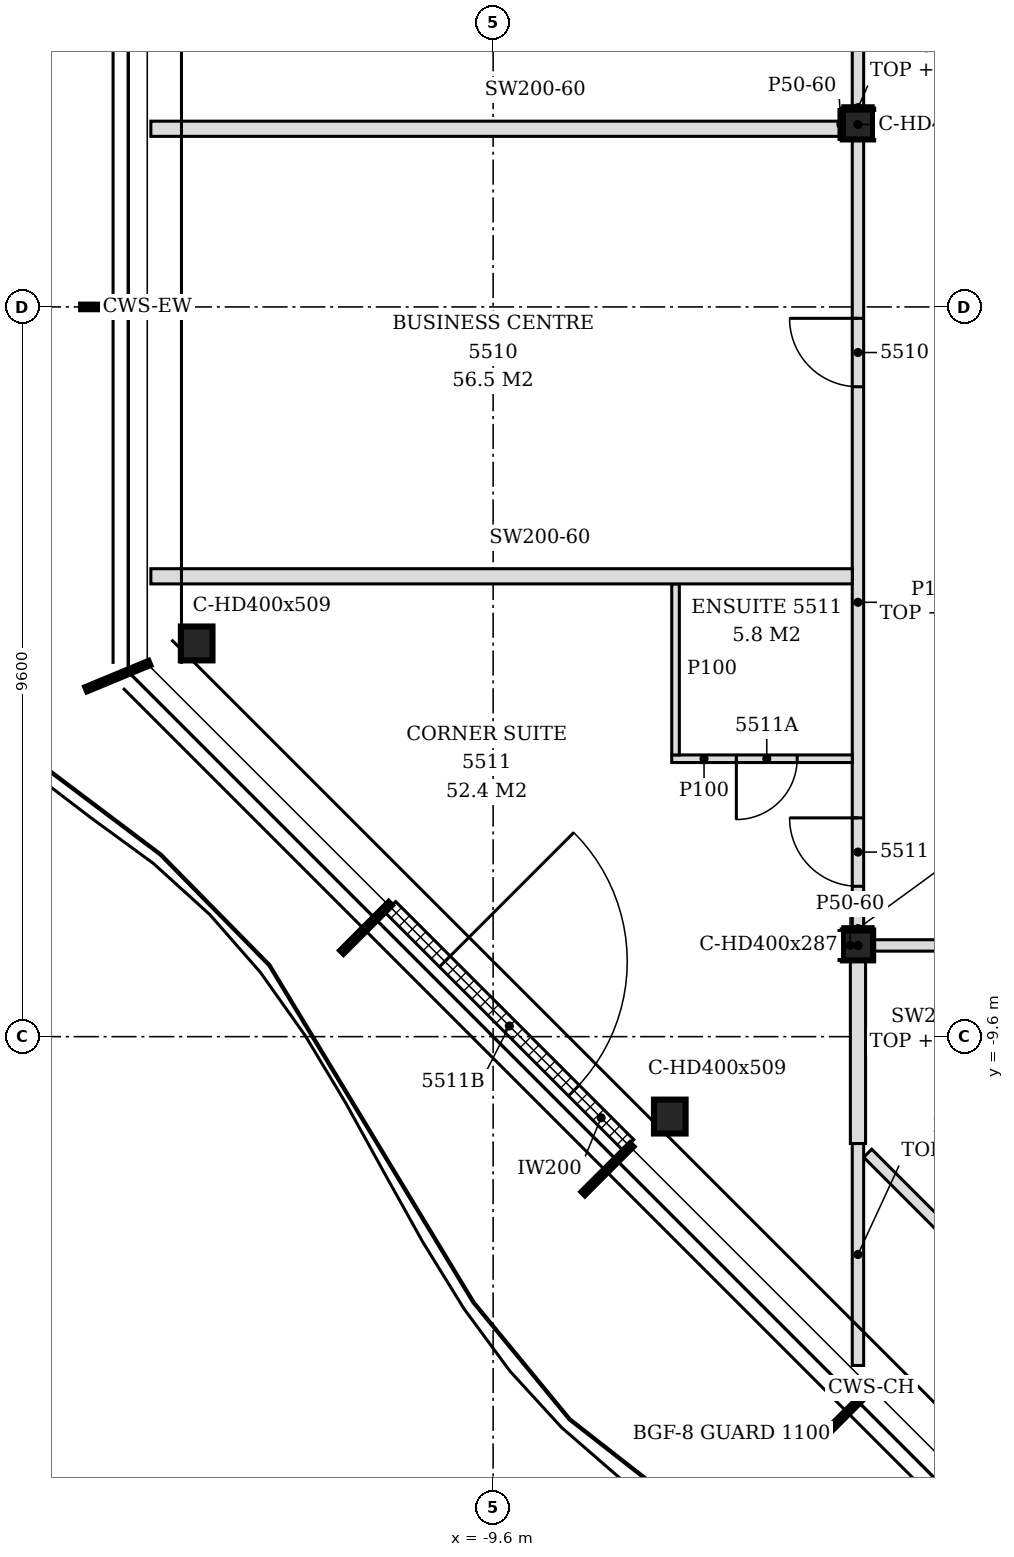
"""IFC4 building model, lengths in metres.
Left out: names, types, materials, properties, quantities, classifications, styles, units other than length and angle.
Written with IfcOpenShell. Run it as: python <this file> out.ifc"""

import sys

from ifc_helpers import new_model, si_unit, direction, frame, frame_2d, origin, origin_2d, place, context, subcontext, project, spatial, polyline, rectangle, i_section, outline, extrude, element, fill, save


model = new_model("IFC4")
c1 = context("Model", 3, precision=1e-05, world=origin(), true_north=direction((0.0, 1.0)))
c2 = subcontext(c1, "Body", "Model", "MODEL_VIEW")
j1 = project(units=[si_unit("LENGTHUNIT", "METRE"), si_unit("PLANEANGLEUNIT", "RADIAN")], contexts=[c1])
p1 = place(None, origin())
s1 = spatial("IfcSite", under=j1, at=p1, CompositionType="ELEMENT")
p2 = place(p1, origin())
s2 = spatial("IfcBuilding", under=s1, at=p2, CompositionType="ELEMENT")
p3 = place(p2, frame((0.0, 0.0, 217.8)))
s3 = spatial("IfcBuildingStorey", under=s2, at=p3, CompositionType="ELEMENT", Elevation=217.8)
for number, where, z_axis, x_axis in (
    (1, (-13.5, -4.427, -0.15), (0.0, 0.0, 1.0), (1.0, 0.0, 0.0)),
    (2, (-7.276, -10.652, -0.15), (0.0, 0.0, 1.0), (1.0, 0.0, 0.0)),
):
    element("IfcColumn", number, at=place(p3, frame(where, z_axis=z_axis, x_axis=x_axis)), inside=s3, PredefinedType="COLUMN", context=c2, shape_type="SweptSolid", body=[
        extrude(i_section(OverallWidth=0.416, OverallDepth=0.446, WebThickness=0.039, FlangeThickness=0.063, FilletRadius=0.015, at=origin_2d()), origin(), (0.0, 0.0, 1.0), 3.6),
    ])
for number, where, z_axis, x_axis in (
    (3, (-4.8, -8.4, -0.15), (0.0, 0.0, 1.0), (1.0, 0.0, 0.0)),
    (4, (-4.8, 2.4, -0.15), (0.0, 0.0, 1.0), (1.0, 0.0, 0.0)),
):
    element("IfcColumn", number, at=place(p3, frame(where, z_axis=z_axis, x_axis=x_axis)), inside=s3, PredefinedType="COLUMN", context=c2, shape_type="SweptSolid", body=[
        extrude(i_section(OverallWidth=0.399, OverallDepth=0.393, WebThickness=0.023, FlangeThickness=0.037, FilletRadius=0.015, at=origin_2d()), origin(), (0.0, 0.0, 1.0), 3.6),
    ])
p4 = place(p3, frame((-10.953, -7.893, 0.0), z_axis=(0.0, 0.0, 1.0), x_axis=(0.707106781187, -0.707106781187, 0.0)))
e5 = element("IfcWall", 5, at=p4, inside=s3, PredefinedType="NOTDEFINED", context=c2, shape_type="SweptSolid", body=[
    extrude(rectangle(XDim=4.431, YDim=0.2, at=frame_2d((2.215, 0.0))), origin(), (0.0, 0.0, 1.0), 3.45),
])
p5 = place(p4, frame((1.015, 0.0, 0.0)))
e6 = element("IfcOpeningElement", 6, at=p5, cuts=e5, PredefinedType="OPENING", context=c2, shape_type="SweptSolid", body=[
    extrude(rectangle(XDim=2.4, YDim=2.4, at=frame_2d((1.2, 1.2))), frame((0.0, 0.11, 0.0), z_axis=(0.0, -1.0, 0.0), x_axis=(1.0, 0.0, 0.0)), (0.0, 0.0, 1.0), 0.22),
])
p6 = place(p3, frame((-1.534, -14.272, 0.0), z_axis=(0.0, 0.0, 1.0), x_axis=(-0.707134287042, 0.707079274261, 0.0)))
e7 = element("IfcWall", 7, at=p6, inside=s3, PredefinedType="PARTITIONING", context=c2, shape_type="SweptSolid", body=[
    extrude(rectangle(XDim=4.438, YDim=0.15, at=frame_2d((2.219, 0.0))), origin(), (0.0, 0.0, 1.0), 2.93),
])
p7 = place(p3, frame((-4.8, -13.926, 0.0), z_axis=(0.0, 0.0, 1.0), x_axis=(0.0, 1.0, 0.0)))
e8 = element("IfcWall", 8, at=p7, inside=s3, PredefinedType="PARTITIONING", context=c2, shape_type="SweptSolid", body=[
    extrude(outline(polyline([(0.0, 0.0), (2.92, 0.0), (2.92, 3.03), (1.369, 3.03), (1.367, 2.63), (0.229, 2.63), (0.227, 3.03), (0.0, 3.03), (0.0, 0.0)])), frame((0.0, 0.075, 0.0), z_axis=(0.0, -1.0, 0.0), x_axis=(1.0, 0.0, 0.0)), (0.0, 0.0, 1.0), 0.15),
])
p8 = place(p3, frame((-4.8, -11.006, 0.0), z_axis=(0.0, 0.0, 1.0), x_axis=(0.0, 1.0, 0.0)))
e9 = element("IfcWall", 9, at=p8, inside=s3, PredefinedType="PARTITIONING", context=c2, shape_type="SweptSolid", body=[
    extrude(rectangle(XDim=2.41, YDim=0.2, at=frame_2d((1.205, 0.0))), origin(), (0.0, 0.0, 1.0), 3.03),
])
p9 = place(p3, frame((-4.601, -8.4, 0.0), z_axis=(0.0, 0.0, 1.0), x_axis=(1.0, 0.0, 0.0)))
e10 = element("IfcWall", 10, at=p9, inside=s3, PredefinedType="PARTITIONING", context=c2, shape_type="SweptSolid", body=[
    extrude(rectangle(XDim=4.676, YDim=0.15, at=frame_2d((2.338, 0.0))), origin(), (0.0, 0.0, 1.0), 2.83),
])
p10 = place(p3, frame((-4.8, -8.204, 0.0), z_axis=(0.0, 0.0, 1.0), x_axis=(0.0, 1.0, 0.0)))
e11 = element("IfcWall", 11, at=p10, inside=s3, PredefinedType="PARTITIONING", context=c2, shape_type="SweptSolid", body=[
    extrude(rectangle(XDim=10.407, YDim=0.15, at=frame_2d((5.204, 0.0))), origin(), (0.0, 0.0, 1.0), 2.83),
])
p11 = place(p10, frame((7.154, 0.0, 0.0)))
e12 = element("IfcOpeningElement", 12, at=p11, cuts=e11, PredefinedType="OPENING", context=c2, shape_type="SweptSolid", body=[
    extrude(rectangle(XDim=0.9, YDim=2.1, at=frame_2d((0.45, 1.05))), frame((0.0, 0.085, 0.0), z_axis=(0.0, -1.0, 0.0), x_axis=(1.0, 0.0, 0.0)), (0.0, 0.0, 1.0), 0.17),
])
p12 = place(p10, frame((0.582, 0.0, 0.0)))
e13 = element("IfcOpeningElement", 13, at=p12, cuts=e11, PredefinedType="OPENING", context=c2, shape_type="SweptSolid", body=[
    extrude(rectangle(XDim=0.9, YDim=2.1, at=frame_2d((0.45, 1.05))), frame((0.0, 0.085, 0.0), z_axis=(0.0, -1.0, 0.0), x_axis=(1.0, 0.0, 0.0)), (0.0, 0.0, 1.0), 0.17),
])
p13 = place(p3, frame((-7.25, -5.944, 0.0), z_axis=(0.0, 0.0, 1.0), x_axis=(1.0, 0.0, 0.0)))
e14 = element("IfcWall", 14, at=p13, inside=s3, PredefinedType="PARTITIONING", context=c2, shape_type="SweptSolid", body=[
    extrude(outline(polyline([(0.0, 0.0), (2.375, 0.0), (2.375, 2.83), (2.3, 2.83), (2.298, 3.45), (0.0, 3.45), (0.0, 0.0)])), frame((0.0, 0.05, 0.0), z_axis=(0.0, -1.0, 0.0), x_axis=(1.0, 0.0, 0.0)), (0.0, 0.0, 1.0), 0.1),
])
p14 = place(p13, frame((0.85, 0.0, 0.0)))
e15 = element("IfcOpeningElement", 15, at=p14, cuts=e14, PredefinedType="OPENING", context=c2, shape_type="SweptSolid", body=[
    extrude(rectangle(XDim=0.8, YDim=2.1, at=frame_2d((0.4, 1.05))), frame((0.0, 0.06, 0.0), z_axis=(0.0, -1.0, 0.0), x_axis=(1.0, 0.0, 0.0)), (0.0, 0.0, 1.0), 0.12),
])
p15 = place(p3, frame((-7.2, -5.894, 0.0), z_axis=(0.0, 0.0, 1.0), x_axis=(0.0, 1.0, 0.0)))
e16 = element("IfcWall", 16, at=p15, inside=s3, PredefinedType="PARTITIONING", context=c2, shape_type="SweptSolid", body=[
    extrude(outline(polyline([(0.0, 0.0), (2.25, 0.0), (2.25, 3.45), (1.189, 3.45), (1.187, 2.98), (0.999, 2.98), (0.997, 3.45), (0.0, 3.45), (0.0, 0.0)])), frame((0.0, 0.05, 0.0), z_axis=(0.0, -1.0, 0.0), x_axis=(1.0, 0.0, 0.0)), (0.0, 0.0, 1.0), 0.1),
])
p16 = place(p3, frame((-14.103, -3.544, 0.0), z_axis=(0.0, 0.0, 1.0), x_axis=(1.0, 0.0, 0.0)))
e17 = element("IfcWall", 17, at=p16, inside=s3, PredefinedType="PARTITIONING", context=c2, shape_type="SweptSolid", body=[
    extrude(outline(polyline([(0.0, 0.0), (9.228, 0.0), (9.228, 2.83), (9.153, 2.83), (9.151, 3.45), (0.753, 3.45), (0.751, 2.93), (0.453, 2.93), (0.451, 3.45), (0.0, 3.45), (0.0, 0.0)])), frame((0.0, 0.1, 0.0), z_axis=(0.0, -1.0, 0.0), x_axis=(1.0, 0.0, 0.0)), (0.0, 0.0, 1.0), 0.2),
])
p17 = place(p3, frame((-14.103, 2.344, 0.0), z_axis=(0.0, 0.0, 1.0), x_axis=(1.0, 0.0, 0.0)))
e18 = element("IfcWall", 18, at=p17, inside=s3, PredefinedType="PARTITIONING", context=c2, shape_type="SweptSolid", body=[
    extrude(outline(polyline([(0.0, 0.0), (9.104, 0.0), (9.104, 3.45), (0.753, 3.45), (0.751, 2.93), (0.453, 2.93), (0.451, 3.45), (0.0, 3.45), (0.0, 0.0)])), frame((0.0, 0.1, 0.0), z_axis=(0.0, -1.0, 0.0), x_axis=(1.0, 0.0, 0.0)), (0.0, 0.0, 1.0), 0.2),
])
p18 = place(p3, frame((-4.8, 2.596, 0.0), z_axis=(0.0, 0.0, 1.0), x_axis=(0.0, 1.0, 0.0)))
e19 = element("IfcWall", 19, at=p18, inside=s3, PredefinedType="PARTITIONING", context=c2, shape_type="SweptSolid", body=[
    extrude(outline(polyline([(0.0, 0.0), (10.407, 0.0), (10.407, 2.63), (9.961, 2.63), (9.959, 2.83), (0.0, 2.83), (0.0, 0.0)])), frame((0.0, 0.075, 0.0), z_axis=(0.0, -1.0, 0.0), x_axis=(1.0, 0.0, 0.0)), (0.0, 0.0, 1.0), 0.15),
])
for number, where, z_axis, x_axis in (
    (20, (-5.024, -8.596, 0.0), (0.0, 0.0, 1.0), (0.0, 1.0, 0.0)),
    (21, (-5.024, 2.204, 0.0), (0.0, 0.0, 1.0), (0.0, 1.0, 0.0)),
):
    element("IfcWall", number, at=place(p3, frame(where, z_axis=z_axis, x_axis=x_axis)), inside=s3, PredefinedType="PARTITIONING", context=c2, shape_type="SweptSolid", body=[
        extrude(rectangle(XDim=0.393, YDim=0.05, at=frame_2d((0.196, 0.0))), origin(), (0.0, 0.0, 1.0), 3.45),
    ])
for number, where, z_axis, x_axis in (
    (22, (-5.0, -8.178, 0.0), (0.0, 0.0, 1.0), (1.0, 0.0, 0.0)),
    (23, (-5.0, 2.622, 0.0), (0.0, 0.0, 1.0), (1.0, 0.0, 0.0)),
):
    element("IfcWall", number, at=place(p3, frame(where, z_axis=z_axis, x_axis=x_axis)), inside=s3, PredefinedType="PARTITIONING", context=c2, shape_type="SweptSolid", body=[
        extrude(rectangle(XDim=0.399, YDim=0.05, at=frame_2d((0.199, 0.0))), origin(), (0.0, 0.0, 1.0), 2.83),
    ])
p19 = place(p5, origin())
e24 = element("IfcDoor", 24, at=p19, inside=s3, OperationType="SINGLE_SWING_LEFT", PredefinedType="DOOR", context=c2, shape_type="SweptSolid", body=[
    extrude(rectangle(XDim=2.4, YDim=2.4, at=frame_2d((1.2, 1.2))), frame((0.0, 0.025, 0.0), z_axis=(0.0, -1.0, 0.0), x_axis=(1.0, 0.0, 0.0)), (0.0, 0.0, 1.0), 0.05),
])
fill(e6, e24)
p20 = place(p11, origin())
e25 = element("IfcDoor", 25, at=p20, inside=s3, OperationType="SINGLE_SWING_RIGHT", PredefinedType="DOOR", context=c2, shape_type="SweptSolid", body=[
    extrude(rectangle(XDim=0.9, YDim=2.1, at=frame_2d((0.45, 1.05))), frame((0.0, 0.025, 0.0), z_axis=(0.0, -1.0, 0.0), x_axis=(1.0, 0.0, 0.0)), (0.0, 0.0, 1.0), 0.05),
])
fill(e12, e25)
p21 = place(p12, origin())
e26 = element("IfcDoor", 26, at=p21, inside=s3, OperationType="SINGLE_SWING_RIGHT", PredefinedType="DOOR", context=c2, shape_type="SweptSolid", body=[
    extrude(rectangle(XDim=0.9, YDim=2.1, at=frame_2d((0.45, 1.05))), frame((0.0, 0.025, 0.0), z_axis=(0.0, -1.0, 0.0), x_axis=(1.0, 0.0, 0.0)), (0.0, 0.0, 1.0), 0.05),
])
fill(e13, e26)
p22 = place(p14, frame((0.8, 0.0, 0.0), z_axis=(0.0, 0.0, 1.0), x_axis=(-1.0, 0.0, 0.0)))
e27 = element("IfcDoor", 27, at=p22, inside=s3, OperationType="SINGLE_SWING_RIGHT", PredefinedType="DOOR", context=c2, shape_type="SweptSolid", body=[
    extrude(rectangle(XDim=0.8, YDim=2.1, at=frame_2d((0.4, 1.05))), frame((0.0, 0.025, 0.0), z_axis=(0.0, -1.0, 0.0), x_axis=(1.0, 0.0, 0.0)), (0.0, 0.0, 1.0), 0.05),
])
fill(e15, e27)
save(model, sys.argv[1])
